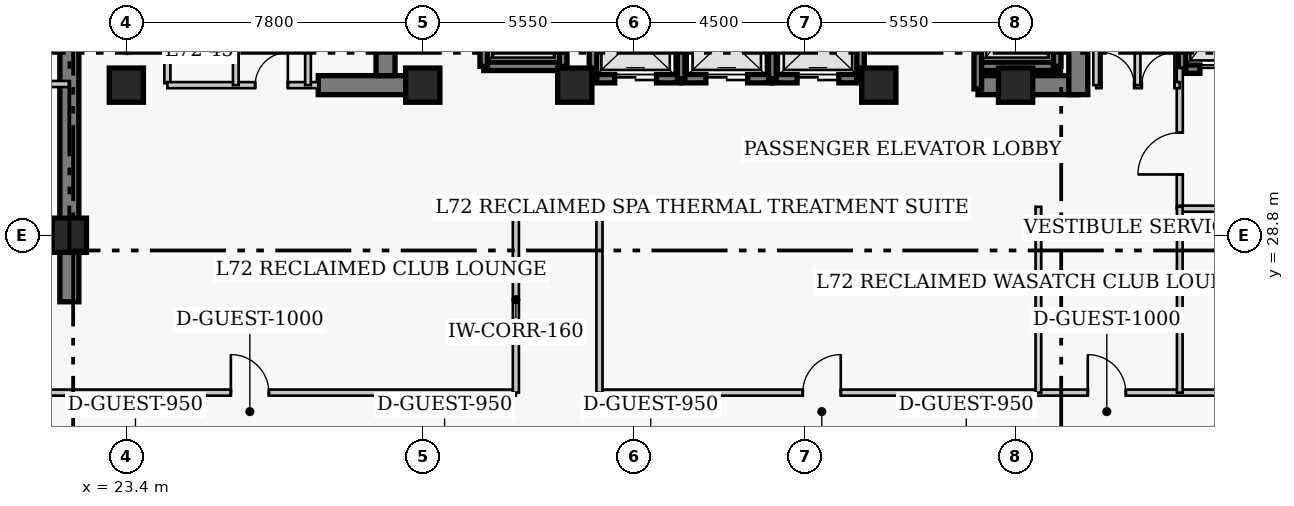
"""IFC4 building model, lengths in metres.
Left out: names, types, materials, properties, quantities, classifications, styles, units other than length and angle.
Written with IfcOpenShell. Run it as: python <this file> out.ifc"""

import sys

from ifc_helpers import new_model, si_unit, direction, frame, frame_2d, origin, origin_2d, place, context, subcontext, project, spatial, rectangle, extrude, element, fill, save


model = new_model("IFC4")
c1 = context("Model", 3, precision=1e-05, world=origin(), true_north=direction((0.0, 1.0)))
c2 = subcontext(c1, "Body", "Model", "MODEL_VIEW")
j1 = project(units=[si_unit("LENGTHUNIT", "METRE"), si_unit("PLANEANGLEUNIT", "RADIAN")], contexts=[c1])
p1 = place(None, origin())
s1 = spatial("IfcSite", under=j1, at=p1, CompositionType="ELEMENT")
p2 = place(p1, origin())
s2 = spatial("IfcBuilding", under=s1, at=p2, CompositionType="ELEMENT")
p3 = place(p2, frame((0.0, 0.0, 289.4)))
s3 = spatial("IfcBuildingStorey", under=s2, at=p3, CompositionType="ELEMENT", Elevation=289.4)
p4 = place(p3, frame((21.9, 27.05, 0.0), z_axis=(0.0, 0.0, 1.0), x_axis=(0.0, 1.0, 0.0)))
e1 = element("IfcWall", 1, at=p4, inside=s3, PredefinedType="SHEAR", context=c2, shape_type="SweptSolid", body=[
    extrude(rectangle(XDim=13.52, YDim=0.5, at=frame_2d((6.76, 0.0))), origin(), (0.0, 0.0, 1.0), 4.0),
])
p5 = place(p3, frame((28.45, 32.75, 0.0), z_axis=(0.0, 0.0, 1.0), x_axis=(1.0, 0.0, 0.0)))
e2 = element("IfcWall", 2, at=p5, inside=s3, PredefinedType="SHEAR", context=c2, shape_type="SweptSolid", body=[
    extrude(rectangle(XDim=2.4, YDim=0.5, at=frame_2d((1.2, 0.0))), origin(), (0.0, 0.0, 1.0), 4.0),
])
p6 = place(p3, frame((45.81, 32.75, 0.0), z_axis=(0.0, 0.0, 1.0), x_axis=(1.0, 0.0, 0.0)))
e3 = element("IfcWall", 3, at=p6, inside=s3, PredefinedType="SHEAR", context=c2, shape_type="SweptSolid", body=[
    extrude(rectangle(XDim=2.64, YDim=0.5, at=frame_2d((1.32, 0.0))), origin(), (0.0, 0.0, 1.0), 4.0),
])
p7 = place(p3, frame((30.22, 33.0, 0.0), z_axis=(0.0, 0.0, 1.0), x_axis=(0.0, 1.0, 0.0)))
e4 = element("IfcWall", 4, at=p7, inside=s3, PredefinedType="SHEAR", context=c2, shape_type="SweptSolid", body=[
    extrude(rectangle(XDim=7.32, YDim=0.5, at=frame_2d((3.66, 0.0))), origin(), (0.0, 0.0, 1.0), 4.0),
])
p8 = place(p3, frame((48.45, 32.5, 0.0), z_axis=(0.0, 0.0, 1.0), x_axis=(0.0, 1.0, 0.0)))
e5 = element("IfcWall", 5, at=p8, inside=s3, PredefinedType="SHEAR", context=c2, shape_type="SweptSolid", body=[
    extrude(rectangle(XDim=7.82, YDim=0.5, at=frame_2d((3.91, 0.0))), origin(), (0.0, 0.0, 1.0), 4.0),
])
p9 = place(p8, frame((5.7, 0.0, 0.0)))
e6 = element("IfcOpeningElement", 6, at=p9, cuts=e5, PredefinedType="OPENING", context=c2, shape_type="SweptSolid", body=[
    extrude(rectangle(XDim=1.1, YDim=2.15, at=frame_2d((0.55, 1.075))), frame((0.0, 0.26, 0.0), z_axis=(0.0, -1.0, 0.0), x_axis=(1.0, 0.0, 0.0)), (0.0, 0.0, 1.0), 0.52),
])
for number, where, z_axis, x_axis in (
    (7, (21.9, 28.8, 0.0), (0.0, 0.0, 1.0), (1.0, 0.0, 0.0)),
    (8, (23.4, 32.75, 0.0), (0.0, 0.0, 1.0), (1.0, 0.0, 0.0)),
    (9, (31.2, 32.75, 0.0), (0.0, 0.0, 1.0), (1.0, 0.0, 0.0)),
    (10, (35.2, 32.75, 0.0), (0.0, 0.0, 1.0), (1.0, 0.0, 0.0)),
    (11, (43.2, 32.75, 0.0), (0.0, 0.0, 1.0), (1.0, 0.0, 0.0)),
    (12, (46.8, 32.75, 0.0), (0.0, 0.0, 1.0), (1.0, 0.0, 0.0)),
):
    element("IfcColumn", number, at=place(p3, frame(where, z_axis=z_axis, x_axis=x_axis)), inside=s3, PredefinedType="COLUMN", context=c2, shape_type="SweptSolid", body=[
        extrude(rectangle(XDim=0.9, YDim=0.9, at=origin_2d()), origin(), (0.0, 0.0, 1.0), 4.0),
    ])
p10 = place(p3, frame((35.68, 32.92, 0.0), z_axis=(0.0, 0.0, 1.0), x_axis=(1.0, 0.0, 0.0)))
e13 = element("IfcWall", 13, at=p10, inside=s3, PredefinedType="SHEAR", context=c2, shape_type="SweptSolid", body=[
    extrude(rectangle(XDim=2.32, YDim=0.22, at=frame_2d((1.16, 0.0))), origin(), (0.0, 0.0, 1.0), 4.0),
])
p11 = place(p10, frame((0.57, 0.0, 0.0)))
e14 = element("IfcOpeningElement", 14, at=p11, cuts=e13, PredefinedType="OPENING", context=c2, shape_type="SweptSolid", body=[
    extrude(rectangle(XDim=1.1, YDim=2.15, at=frame_2d((0.55, 1.075))), frame((0.0, 0.12, 0.0), z_axis=(0.0, -1.0, 0.0), x_axis=(1.0, 0.0, 0.0)), (0.0, 0.0, 1.0), 0.24),
])
p12 = place(p3, frame((35.68, 32.92, 0.0), z_axis=(0.0, 0.0, 1.0), x_axis=(0.0, 1.0, 0.0)))
e15 = element("IfcWall", 15, at=p12, inside=s3, PredefinedType="SHEAR", context=c2, shape_type="SweptSolid", body=[
    extrude(rectangle(XDim=2.16, YDim=0.2, at=frame_2d((1.08, 0.0))), origin(), (0.0, 0.0, 1.0), 4.0),
])
p13 = place(p3, frame((38.0, 32.92, 0.0), z_axis=(0.0, 0.0, 1.0), x_axis=(1.0, 0.0, 0.0)))
e16 = element("IfcWall", 16, at=p13, inside=s3, PredefinedType="SHEAR", context=c2, shape_type="SweptSolid", body=[
    extrude(rectangle(XDim=2.4, YDim=0.22, at=frame_2d((1.2, 0.0))), origin(), (0.0, 0.0, 1.0), 4.0),
])
p14 = place(p13, frame((0.65, 0.0, 0.0)))
e17 = element("IfcOpeningElement", 17, at=p14, cuts=e16, PredefinedType="OPENING", context=c2, shape_type="SweptSolid", body=[
    extrude(rectangle(XDim=1.1, YDim=2.15, at=frame_2d((0.55, 1.075))), frame((0.0, 0.12, 0.0), z_axis=(0.0, -1.0, 0.0), x_axis=(1.0, 0.0, 0.0)), (0.0, 0.0, 1.0), 0.24),
])
p15 = place(p3, frame((38.0, 32.92, 0.0), z_axis=(0.0, 0.0, 1.0), x_axis=(0.0, 1.0, 0.0)))
e18 = element("IfcWall", 18, at=p15, inside=s3, PredefinedType="SHEAR", context=c2, shape_type="SweptSolid", body=[
    extrude(rectangle(XDim=2.16, YDim=0.2, at=frame_2d((1.08, 0.0))), origin(), (0.0, 0.0, 1.0), 4.0),
])
p16 = place(p3, frame((40.4, 32.92, 0.0), z_axis=(0.0, 0.0, 1.0), x_axis=(1.0, 0.0, 0.0)))
e19 = element("IfcWall", 19, at=p16, inside=s3, PredefinedType="SHEAR", context=c2, shape_type="SweptSolid", body=[
    extrude(rectangle(XDim=2.32, YDim=0.22, at=frame_2d((1.16, 0.0))), origin(), (0.0, 0.0, 1.0), 4.0),
])
p17 = place(p16, frame((0.65, 0.0, 0.0)))
e20 = element("IfcOpeningElement", 20, at=p17, cuts=e19, PredefinedType="OPENING", context=c2, shape_type="SweptSolid", body=[
    extrude(rectangle(XDim=1.1, YDim=2.15, at=frame_2d((0.55, 1.075))), frame((0.0, 0.12, 0.0), z_axis=(0.0, -1.0, 0.0), x_axis=(1.0, 0.0, 0.0)), (0.0, 0.0, 1.0), 0.24),
])
for number, where, z_axis, x_axis in (
    (21, (40.4, 32.92, 0.0), (0.0, 0.0, 1.0), (0.0, 1.0, 0.0)),
    (22, (42.72, 32.92, 0.0), (0.0, 0.0, 1.0), (0.0, 1.0, 0.0)),
):
    element("IfcWall", number, at=place(p3, frame(where, z_axis=z_axis, x_axis=x_axis)), inside=s3, PredefinedType="SHEAR", context=c2, shape_type="SweptSolid", body=[
        extrude(rectangle(XDim=2.16, YDim=0.2, at=frame_2d((1.08, 0.0))), origin(), (0.0, 0.0, 1.0), 4.0),
    ])
p18 = place(p3, frame((51.18, 33.17, 0.0), z_axis=(0.0, 0.0, 1.0), x_axis=(1.0, 0.0, 0.0)))
e23 = element("IfcWall", 23, at=p18, inside=s3, PredefinedType="SHEAR", context=c2, shape_type="SweptSolid", body=[
    extrude(rectangle(XDim=2.42, YDim=0.22, at=frame_2d((1.21, 0.0))), origin(), (0.0, 0.0, 1.0), 4.0),
])
p19 = place(p18, frame((0.47, 0.0, 0.0)))
e24 = element("IfcOpeningElement", 24, at=p19, cuts=e23, PredefinedType="OPENING", context=c2, shape_type="SweptSolid", body=[
    extrude(rectangle(XDim=1.3, YDim=2.15, at=frame_2d((0.65, 1.075))), frame((0.0, 0.12, 0.0), z_axis=(0.0, -1.0, 0.0), x_axis=(1.0, 0.0, 0.0)), (0.0, 0.0, 1.0), 0.24),
])
p20 = place(p3, frame((51.18, 33.17, 0.0), z_axis=(0.0, 0.0, 1.0), x_axis=(0.0, 1.0, 0.0)))
e25 = element("IfcWall", 25, at=p20, inside=s3, PredefinedType="SHEAR", context=c2, shape_type="SweptSolid", body=[
    extrude(rectangle(XDim=2.86, YDim=0.2, at=frame_2d((1.43, 0.0))), origin(), (0.0, 0.0, 1.0), 4.0),
])
p21 = place(p3, frame((32.805, 33.245, 0.0), z_axis=(0.0, 0.0, 1.0), x_axis=(1.0, 0.0, 0.0)))
e26 = element("IfcWall", 26, at=p21, inside=s3, PredefinedType="SHEAR", context=c2, shape_type="SweptSolid", body=[
    extrude(rectangle(XDim=2.09, YDim=0.22, at=frame_2d((1.045, 0.0))), origin(), (0.0, 0.0, 1.0), 4.0),
])
for number, where, z_axis, x_axis in (
    (27, (32.805, 33.245, 0.0), (0.0, 0.0, 1.0), (0.0, 1.0, 0.0)),
    (28, (34.895, 33.245, 0.0), (0.0, 0.0, 1.0), (0.0, 1.0, 0.0)),
):
    element("IfcWall", number, at=place(p3, frame(where, z_axis=z_axis, x_axis=x_axis)), inside=s3, PredefinedType="SHEAR", context=c2, shape_type="SweptSolid", body=[
        extrude(rectangle(XDim=2.91, YDim=0.2, at=frame_2d((1.455, 0.0))), origin(), (0.0, 0.0, 1.0), 4.0),
    ])
p22 = place(p3, frame((45.805, 33.245, 0.0), z_axis=(0.0, 0.0, 1.0), x_axis=(1.0, 0.0, 0.0)))
e29 = element("IfcWall", 29, at=p22, inside=s3, PredefinedType="SHEAR", context=c2, shape_type="SweptSolid", body=[
    extrude(rectangle(XDim=2.09, YDim=0.22, at=frame_2d((1.045, 0.0))), origin(), (0.0, 0.0, 1.0), 4.0),
])
p23 = place(p3, frame((45.805, 32.65, 0.0), z_axis=(0.0, 0.0, 1.0), x_axis=(0.0, 1.0, 0.0)))
e30 = element("IfcWall", 30, at=p23, inside=s3, PredefinedType="SHEAR", context=c2, shape_type="SweptSolid", body=[
    extrude(rectangle(XDim=3.505, YDim=0.2, at=frame_2d((1.752, 0.0))), origin(), (0.0, 0.0, 1.0), 4.0),
])
p24 = place(p3, frame((47.895, 33.245, 0.0), z_axis=(0.0, 0.0, 1.0), x_axis=(0.0, 1.0, 0.0)))
e31 = element("IfcWall", 31, at=p24, inside=s3, PredefinedType="SHEAR", context=c2, shape_type="SweptSolid", body=[
    extrude(rectangle(XDim=2.91, YDim=0.2, at=frame_2d((1.455, 0.0))), origin(), (0.0, 0.0, 1.0), 4.0),
])
p25 = place(p3, frame((24.48, 32.8, 0.0), z_axis=(0.0, 0.0, 1.0), x_axis=(0.0, 1.0, 0.0)))
e32 = element("IfcWall", 32, at=p25, inside=s3, PredefinedType="PARTITIONING", context=c2, shape_type="SweptSolid", body=[
    extrude(rectangle(XDim=3.57, YDim=0.16, at=frame_2d((1.785, 0.0))), origin(), (0.0, 0.0, 1.0), 3.76),
])
p26 = place(p25, frame((1.604, 0.0, 0.0)))
e33 = element("IfcOpeningElement", 33, at=p26, cuts=e32, PredefinedType="OPENING", context=c2, shape_type="SweptSolid", body=[
    extrude(rectangle(XDim=0.9, YDim=2.1, at=frame_2d((0.45, 1.05))), frame((0.0, 0.09, 0.0), z_axis=(0.0, -1.0, 0.0), x_axis=(1.0, 0.0, 0.0)), (0.0, 0.0, 1.0), 0.18),
])
p27 = place(p3, frame((51.12, 29.5, 0.0), z_axis=(0.0, 0.0, 1.0), x_axis=(0.0, 1.0, 0.0)))
e34 = element("IfcWall", 34, at=p27, inside=s3, PredefinedType="PARTITIONING", context=c2, shape_type="SweptSolid", body=[
    extrude(rectangle(XDim=3.7, YDim=0.16, at=frame_2d((1.85, 0.0))), origin(), (0.0, 0.0, 1.0), 3.76),
])
p28 = place(p27, frame((0.9, 0.0, 0.0)))
e35 = element("IfcOpeningElement", 35, at=p28, cuts=e34, PredefinedType="OPENING", context=c2, shape_type="SweptSolid", body=[
    extrude(rectangle(XDim=1.1, YDim=2.15, at=frame_2d((0.55, 1.075))), frame((0.0, 0.09, 0.0), z_axis=(0.0, -1.0, 0.0), x_axis=(1.0, 0.0, 0.0)), (0.0, 0.0, 1.0), 0.18),
])
p29 = place(p3, frame((51.12, 29.5, 0.0), z_axis=(0.0, 0.0, 1.0), x_axis=(1.0, 0.0, 0.0)))
e36 = element("IfcWall", 36, at=p29, inside=s3, PredefinedType="PARTITIONING", context=c2, shape_type="SweptSolid", body=[
    extrude(rectangle(XDim=5.63, YDim=0.16, at=frame_2d((2.815, 0.0))), origin(), (0.0, 0.0, 1.0), 3.76),
])
p30 = place(p3, frame((24.48, 32.75, 0.0), z_axis=(0.0, 0.0, 1.0), x_axis=(1.0, 0.0, 0.0)))
e37 = element("IfcWall", 37, at=p30, inside=s3, PredefinedType="PARTITIONING", context=c2, shape_type="SweptSolid", body=[
    extrude(rectangle(XDim=3.97, YDim=0.16, at=frame_2d((1.985, 0.0))), origin(), (0.0, 0.0, 1.0), 3.76),
])
p31 = place(p30, frame((2.31, 0.0, 0.0)))
e38 = element("IfcOpeningElement", 38, at=p31, cuts=e37, PredefinedType="OPENING", context=c2, shape_type="SweptSolid", body=[
    extrude(rectangle(XDim=0.86, YDim=2.05, at=frame_2d((0.43, 1.025))), frame((0.0, 0.09, 0.0), z_axis=(0.0, -1.0, 0.0), x_axis=(1.0, 0.0, 0.0)), (0.0, 0.0, 1.0), 0.18),
])
p32 = place(p3, frame((48.92, 32.75, 0.0), z_axis=(0.0, 0.0, 1.0), x_axis=(1.0, 0.0, 0.0)))
e39 = element("IfcWall", 39, at=p32, inside=s3, PredefinedType="PARTITIONING", context=c2, shape_type="SweptSolid", body=[
    extrude(rectangle(XDim=2.2, YDim=0.16, at=frame_2d((1.1, 0.0))), origin(), (0.0, 0.0, 1.0), 3.76),
])
p33 = place(p32, frame((0.14, 0.0, 0.0)))
e40 = element("IfcOpeningElement", 40, at=p33, cuts=e39, PredefinedType="OPENING", context=c2, shape_type="SweptSolid", body=[
    extrude(rectangle(XDim=0.86, YDim=2.05, at=frame_2d((0.43, 1.025))), frame((0.0, 0.09, 0.0), z_axis=(0.0, -1.0, 0.0), x_axis=(1.0, 0.0, 0.0)), (0.0, 0.0, 1.0), 0.18),
])
p34 = place(p32, frame((1.2, 0.0, 0.0)))
e41 = element("IfcOpeningElement", 41, at=p34, cuts=e39, PredefinedType="OPENING", context=c2, shape_type="SweptSolid", body=[
    extrude(rectangle(XDim=0.86, YDim=2.05, at=frame_2d((0.43, 1.025))), frame((0.0, 0.09, 0.0), z_axis=(0.0, -1.0, 0.0), x_axis=(1.0, 0.0, 0.0)), (0.0, 0.0, 1.0), 0.18),
])
for number, where, z_axis, x_axis in (
    (42, (48.92, 32.75, 0.0), (0.0, 0.0, 1.0), (0.0, 1.0, 0.0)),
    (43, (26.28, 32.75, 0.0), (0.0, 0.0, 1.0), (0.0, 1.0, 0.0)),
    (44, (28.18, 32.75, 0.0), (0.0, 0.0, 1.0), (0.0, 1.0, 0.0)),
    (45, (50.01, 32.75, 0.0), (0.0, 0.0, 1.0), (0.0, 1.0, 0.0)),
):
    element("IfcWall", number, at=place(p3, frame(where, z_axis=z_axis, x_axis=x_axis)), inside=s3, PredefinedType="PARTITIONING", context=c2, shape_type="SweptSolid", body=[
        extrude(rectangle(XDim=3.62, YDim=0.15, at=frame_2d((1.81, 0.0))), origin(), (0.0, 0.0, 1.0), 3.76),
    ])
p35 = place(p3, frame((19.9, 24.66, 0.0), z_axis=(0.0, 0.0, 1.0), x_axis=(1.0, 0.0, 0.0)))
e46 = element("IfcWall", 46, at=p35, inside=s3, PredefinedType="PARTITIONING", context=c2, shape_type="SweptSolid", body=[
    extrude(rectangle(XDim=13.75, YDim=0.16, at=frame_2d((6.875, 0.0))), origin(), (0.0, 0.0, 1.0), 3.76),
])
p36 = place(p35, frame((6.25, 0.0, 0.0)))
e47 = element("IfcOpeningElement", 47, at=p36, cuts=e46, PredefinedType="OPENING", context=c2, shape_type="SweptSolid", body=[
    extrude(rectangle(XDim=1.0, YDim=2.15, at=frame_2d((0.5, 1.075))), frame((0.0, 0.09, 0.0), z_axis=(0.0, -1.0, 0.0), x_axis=(1.0, 0.0, 0.0)), (0.0, 0.0, 1.0), 0.18),
])
p37 = place(p3, frame((35.85, 24.66, 0.0), z_axis=(0.0, 0.0, 1.0), x_axis=(1.0, 0.0, 0.0)))
e48 = element("IfcWall", 48, at=p37, inside=s3, PredefinedType="PARTITIONING", context=c2, shape_type="SweptSolid", body=[
    extrude(rectangle(XDim=22.8, YDim=0.16, at=frame_2d((11.4, 0.0))), origin(), (0.0, 0.0, 1.0), 3.76),
])
p38 = place(p37, frame((5.35, 0.0, 0.0)))
e49 = element("IfcOpeningElement", 49, at=p38, cuts=e48, PredefinedType="OPENING", context=c2, shape_type="SweptSolid", body=[
    extrude(rectangle(XDim=1.0, YDim=2.15, at=frame_2d((0.5, 1.075))), frame((0.0, 0.09, 0.0), z_axis=(0.0, -1.0, 0.0), x_axis=(1.0, 0.0, 0.0)), (0.0, 0.0, 1.0), 0.18),
])
p39 = place(p37, frame((12.85, 0.0, 0.0)))
e50 = element("IfcOpeningElement", 50, at=p39, cuts=e48, PredefinedType="OPENING", context=c2, shape_type="SweptSolid", body=[
    extrude(rectangle(XDim=1.0, YDim=2.15, at=frame_2d((0.5, 1.075))), frame((0.0, 0.09, 0.0), z_axis=(0.0, -1.0, 0.0), x_axis=(1.0, 0.0, 0.0)), (0.0, 0.0, 1.0), 0.18),
])
for number, where, z_axis, x_axis in (
    (51, (33.65, 24.66, 0.0), (0.0, 0.0, 1.0), (0.0, 1.0, 0.0)),
    (52, (35.85, 24.66, 0.0), (0.0, 0.0, 1.0), (0.0, 1.0, 0.0)),
):
    element("IfcWall", number, at=place(p3, frame(where, z_axis=z_axis, x_axis=x_axis)), inside=s3, PredefinedType="PARTITIONING", context=c2, shape_type="SweptSolid", body=[
        extrude(rectangle(XDim=4.89, YDim=0.16, at=frame_2d((2.445, 0.0))), origin(), (0.0, 0.0, 1.0), 3.76),
    ])
p40 = place(p3, frame((19.96, 32.78, 0.0), z_axis=(0.0, 0.0, 1.0), x_axis=(1.0, 0.0, 0.0)))
e53 = element("IfcWall", 53, at=p40, inside=s3, PredefinedType="PARTITIONING", context=c2, shape_type="SweptSolid", body=[
    extrude(rectangle(XDim=1.94, YDim=0.16, at=frame_2d((0.97, 0.0))), origin(), (0.0, 0.0, 1.0), 3.76),
])
for number, where, z_axis, x_axis in (
    (54, (47.4, 24.66, 0.0), (0.0, 0.0, 1.0), (0.0, 1.0, 0.0)),
    (55, (51.12, 24.66, 0.0), (0.0, 0.0, 1.0), (0.0, 1.0, 0.0)),
):
    element("IfcWall", number, at=place(p3, frame(where, z_axis=z_axis, x_axis=x_axis)), inside=s3, PredefinedType="PARTITIONING", context=c2, shape_type="SweptSolid", body=[
        extrude(rectangle(XDim=4.89, YDim=0.15, at=frame_2d((2.445, 0.0))), origin(), (0.0, 0.0, 1.0), 3.76),
    ])
p41 = place(p11, origin())
e56 = element("IfcDoor", 56, at=p41, inside=s3, OperationType="DOUBLE_DOOR_SLIDING", PredefinedType="DOOR", context=c2, shape_type="SweptSolid", body=[
    extrude(rectangle(XDim=1.1, YDim=2.15, at=frame_2d((0.55, 1.075))), frame((0.0, 0.025, 0.0), z_axis=(0.0, -1.0, 0.0), x_axis=(1.0, 0.0, 0.0)), (0.0, 0.0, 1.0), 0.05),
])
fill(e14, e56)
p42 = place(p14, origin())
e57 = element("IfcDoor", 57, at=p42, inside=s3, OperationType="DOUBLE_DOOR_SLIDING", PredefinedType="DOOR", context=c2, shape_type="SweptSolid", body=[
    extrude(rectangle(XDim=1.1, YDim=2.15, at=frame_2d((0.55, 1.075))), frame((0.0, 0.025, 0.0), z_axis=(0.0, -1.0, 0.0), x_axis=(1.0, 0.0, 0.0)), (0.0, 0.0, 1.0), 0.05),
])
fill(e17, e57)
p43 = place(p17, origin())
e58 = element("IfcDoor", 58, at=p43, inside=s3, OperationType="DOUBLE_DOOR_SLIDING", PredefinedType="DOOR", context=c2, shape_type="SweptSolid", body=[
    extrude(rectangle(XDim=1.1, YDim=2.15, at=frame_2d((0.55, 1.075))), frame((0.0, 0.025, 0.0), z_axis=(0.0, -1.0, 0.0), x_axis=(1.0, 0.0, 0.0)), (0.0, 0.0, 1.0), 0.05),
])
fill(e20, e58)
p44 = place(p19, origin())
e59 = element("IfcDoor", 59, at=p44, inside=s3, OperationType="DOUBLE_DOOR_SLIDING", PredefinedType="DOOR", context=c2, shape_type="SweptSolid", body=[
    extrude(rectangle(XDim=1.3, YDim=2.15, at=frame_2d((0.65, 1.075))), frame((0.0, 0.025, 0.0), z_axis=(0.0, -1.0, 0.0), x_axis=(1.0, 0.0, 0.0)), (0.0, 0.0, 1.0), 0.05),
])
fill(e24, e59)
p45 = place(p28, origin())
e60 = element("IfcDoor", 60, at=p45, inside=s3, OperationType="SINGLE_SWING_LEFT", PredefinedType="DOOR", context=c2, shape_type="SweptSolid", body=[
    extrude(rectangle(XDim=1.1, YDim=2.15, at=frame_2d((0.55, 1.075))), frame((0.0, 0.025, 0.0), z_axis=(0.0, -1.0, 0.0), x_axis=(1.0, 0.0, 0.0)), (0.0, 0.0, 1.0), 0.05),
])
fill(e35, e60)
p46 = place(p31, origin())
e61 = element("IfcDoor", 61, at=p46, inside=s3, OperationType="SINGLE_SWING_RIGHT", PredefinedType="DOOR", context=c2, shape_type="SweptSolid", body=[
    extrude(rectangle(XDim=0.86, YDim=2.05, at=frame_2d((0.43, 1.025))), frame((0.0, 0.025, 0.0), z_axis=(0.0, -1.0, 0.0), x_axis=(1.0, 0.0, 0.0)), (0.0, 0.0, 1.0), 0.05),
])
fill(e38, e61)
p47 = place(p33, origin())
e62 = element("IfcDoor", 62, at=p47, inside=s3, OperationType="SINGLE_SWING_LEFT", PredefinedType="DOOR", context=c2, shape_type="SweptSolid", body=[
    extrude(rectangle(XDim=0.86, YDim=2.05, at=frame_2d((0.43, 1.025))), frame((0.0, 0.025, 0.0), z_axis=(0.0, -1.0, 0.0), x_axis=(1.0, 0.0, 0.0)), (0.0, 0.0, 1.0), 0.05),
])
fill(e40, e62)
p48 = place(p34, origin())
e63 = element("IfcDoor", 63, at=p48, inside=s3, OperationType="SINGLE_SWING_RIGHT", PredefinedType="DOOR", context=c2, shape_type="SweptSolid", body=[
    extrude(rectangle(XDim=0.86, YDim=2.05, at=frame_2d((0.43, 1.025))), frame((0.0, 0.025, 0.0), z_axis=(0.0, -1.0, 0.0), x_axis=(1.0, 0.0, 0.0)), (0.0, 0.0, 1.0), 0.05),
])
fill(e41, e63)
p49 = place(p36, origin())
e64 = element("IfcDoor", 64, at=p49, inside=s3, OperationType="SINGLE_SWING_LEFT", PredefinedType="DOOR", context=c2, shape_type="SweptSolid", body=[
    extrude(rectangle(XDim=1.0, YDim=2.15, at=frame_2d((0.5, 1.075))), frame((0.0, 0.025, 0.0), z_axis=(0.0, -1.0, 0.0), x_axis=(1.0, 0.0, 0.0)), (0.0, 0.0, 1.0), 0.05),
])
fill(e47, e64)
p50 = place(p38, origin())
e65 = element("IfcDoor", 65, at=p50, inside=s3, OperationType="SINGLE_SWING_RIGHT", PredefinedType="DOOR", context=c2, shape_type="SweptSolid", body=[
    extrude(rectangle(XDim=1.0, YDim=2.15, at=frame_2d((0.5, 1.075))), frame((0.0, 0.025, 0.0), z_axis=(0.0, -1.0, 0.0), x_axis=(1.0, 0.0, 0.0)), (0.0, 0.0, 1.0), 0.05),
])
fill(e49, e65)
p51 = place(p39, origin())
e66 = element("IfcDoor", 66, at=p51, inside=s3, OperationType="SINGLE_SWING_LEFT", PredefinedType="DOOR", context=c2, shape_type="SweptSolid", body=[
    extrude(rectangle(XDim=1.0, YDim=2.15, at=frame_2d((0.5, 1.075))), frame((0.0, 0.025, 0.0), z_axis=(0.0, -1.0, 0.0), x_axis=(1.0, 0.0, 0.0)), (0.0, 0.0, 1.0), 0.05),
])
fill(e50, e66)
save(model, sys.argv[1])
